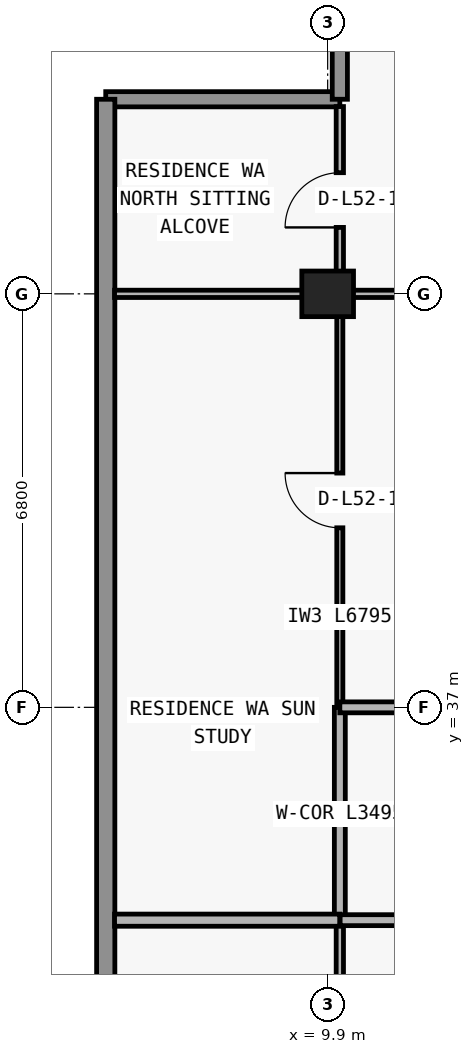
"""IFC4 building model, lengths in metres.
Left out: names, types, materials, properties, quantities, classifications, styles, units other than length and angle.
Written with IfcOpenShell. Run it as: python <this file> out.ifc"""

import sys

from ifc_helpers import new_model, si_unit, direction, frame, frame_2d, origin, origin_2d, place, context, subcontext, project, spatial, rectangle, extrude, element, fill, save


model = new_model("IFC4")
c1 = context("Model", 3, precision=1e-05, world=origin(), true_north=direction((0.0, 1.0)))
c2 = subcontext(c1, "Body", "Model", "MODEL_VIEW")
j1 = project(units=[si_unit("LENGTHUNIT", "METRE"), si_unit("PLANEANGLEUNIT", "RADIAN")], contexts=[c1])
p1 = place(None, origin())
s1 = spatial("IfcSite", under=j1, at=p1, CompositionType="ELEMENT")
p2 = place(p1, origin())
s2 = spatial("IfcBuilding", under=s1, at=p2, CompositionType="ELEMENT")
p3 = place(p2, frame((0.0, 0.0, 188.4)))
s3 = spatial("IfcBuildingStorey", under=s2, at=p3, CompositionType="ELEMENT", Elevation=188.4)
p4 = place(p3, frame((9.9, 43.8, 0.0), z_axis=(0.0, 0.0, 1.0), x_axis=(1.0, 0.0, 0.0)))
e1 = element("IfcColumn", 1, at=p4, inside=s3, PredefinedType="COLUMN", context=c2, shape_type="SweptSolid", body=[
    extrude(rectangle(XDim=0.85, YDim=0.75, at=origin_2d()), origin(), (0.0, 0.0, 1.0), 3.05),
])
p5 = place(p3, frame((6.25, 47.0, 0.0), z_axis=(0.0, 0.0, 1.0), x_axis=(1.0, 0.0, 0.0)))
e2 = element("IfcWall", 2, at=p5, inside=s3, PredefinedType="ELEMENTEDWALL", context=c2, shape_type="SweptSolid", body=[
    extrude(rectangle(XDim=3.85, YDim=0.25, at=frame_2d((1.925, 0.0))), origin(), (0.0, 0.0, 1.0), 3.05),
])
p6 = place(p3, frame((10.1, 47.0, 0.0), z_axis=(0.0, 0.0, 1.0), x_axis=(0.0, 1.0, 0.0)))
e3 = element("IfcWall", 3, at=p6, inside=s3, PredefinedType="ELEMENTEDWALL", context=c2, shape_type="SweptSolid", body=[
    extrude(rectangle(XDim=3.45, YDim=0.25, at=frame_2d((1.725, 0.0))), origin(), (0.0, 0.0, 1.0), 3.05),
])
p7 = place(p3, frame((6.25, 29.1, 0.0), z_axis=(0.0, 0.0, 1.0), x_axis=(0.0, 1.0, 0.0)))
e4 = element("IfcWall", 4, at=p7, inside=s3, PredefinedType="STANDARD", context=c2, shape_type="SweptSolid", body=[
    extrude(rectangle(XDim=17.9, YDim=0.3, at=frame_2d((8.95, 0.0))), origin(), (0.0, 0.0, 1.0), 3.05),
])
p8 = place(p3, frame((10.1, 27.18, 0.0), z_axis=(0.0, 0.0, 1.0), x_axis=(0.0, 1.0, 0.0)))
e5 = element("IfcWall", 5, at=p8, inside=s3, PredefinedType="PARTITIONING", context=c2, shape_type="SweptSolid", body=[
    extrude(rectangle(XDim=6.32, YDim=0.12, at=frame_2d((3.16, 0.0))), origin(), (0.0, 0.0, 1.0), 2.263),
])
p9 = place(p3, frame((10.1, 33.505, 0.0), z_axis=(0.0, 0.0, 1.0), x_axis=(0.0, 1.0, 0.0)))
e6 = element("IfcWall", 6, at=p9, inside=s3, PredefinedType="PARTITIONING", context=c2, shape_type="SweptSolid", body=[
    extrude(rectangle(XDim=3.495, YDim=0.18, at=frame_2d((1.748, 0.0))), origin(), (0.0, 0.0, 1.0), 2.263),
])
p10 = place(p3, frame((10.1, 37.005, 0.0), z_axis=(0.0, 0.0, 1.0), x_axis=(0.0, 1.0, 0.0)))
e7 = element("IfcWall", 7, at=p10, inside=s3, PredefinedType="MOVABLE", context=c2, shape_type="SweptSolid", body=[
    extrude(rectangle(XDim=6.795, YDim=0.1, at=frame_2d((3.397, 0.0))), origin(), (0.0, 0.0, 1.0), 2.263),
])
p11 = place(p10, frame((2.948, 0.0, 0.0)))
e8 = element("IfcOpeningElement", 8, at=p11, cuts=e7, PredefinedType="OPENING", context=c2, shape_type="SweptSolid", body=[
    extrude(rectangle(XDim=0.9, YDim=2.15, at=frame_2d((0.45, 1.075))), frame((0.0, 0.06, 0.0), z_axis=(0.0, -1.0, 0.0), x_axis=(1.0, 0.0, 0.0)), (0.0, 0.0, 1.0), 0.12),
])
p12 = place(p3, frame((10.1, 43.805, 0.0), z_axis=(0.0, 0.0, 1.0), x_axis=(0.0, 1.0, 0.0)))
e9 = element("IfcWall", 9, at=p12, inside=s3, PredefinedType="PARTITIONING", context=c2, shape_type="SweptSolid", body=[
    extrude(rectangle(XDim=3.075, YDim=0.12, at=frame_2d((1.538, 0.0))), origin(), (0.0, 0.0, 1.0), 3.05),
])
p13 = place(p12, frame((1.087, 0.0, 0.0)))
e10 = element("IfcOpeningElement", 10, at=p13, cuts=e9, PredefinedType="OPENING", context=c2, shape_type="SweptSolid", body=[
    extrude(rectangle(XDim=0.9, YDim=2.15, at=frame_2d((0.45, 1.075))), frame((0.0, 0.07, 0.0), z_axis=(0.0, -1.0, 0.0), x_axis=(1.0, 0.0, 0.0)), (0.0, 0.0, 1.0), 0.14),
])
p14 = place(p3, frame((6.395, 33.5, 0.0), z_axis=(0.0, 0.0, 1.0), x_axis=(1.0, 0.0, 0.0)))
e11 = element("IfcWall", 11, at=p14, inside=s3, PredefinedType="PARTITIONING", context=c2, shape_type="SweptSolid", body=[
    extrude(rectangle(XDim=3.705, YDim=0.2, at=frame_2d((1.853, 0.0))), origin(), (0.0, 0.0, 1.0), 3.05),
])
p15 = place(p3, frame((10.105, 33.5, 0.0), z_axis=(0.0, 0.0, 1.0), x_axis=(1.0, 0.0, 0.0)))
e12 = element("IfcWall", 12, at=p15, inside=s3, PredefinedType="PARTITIONING", context=c2, shape_type="SweptSolid", body=[
    extrude(rectangle(XDim=16.545, YDim=0.18, at=frame_2d((8.272, 0.0))), origin(), (0.0, 0.0, 1.0), 3.05),
])
p16 = place(p15, frame((2.824, 0.0, 0.0)))
e13 = element("IfcOpeningElement", 13, at=p16, cuts=e12, PredefinedType="OPENING", context=c2, shape_type="SweptSolid", body=[
    extrude(rectangle(XDim=1.0, YDim=2.2, at=frame_2d((0.5, 1.1))), frame((0.0, 0.1, 0.0), z_axis=(0.0, -1.0, 0.0), x_axis=(1.0, 0.0, 0.0)), (0.0, 0.0, 1.0), 0.2),
])
p17 = place(p3, frame((10.1, 37.0, 0.0), z_axis=(0.0, 0.0, 1.0), x_axis=(1.0, 0.0, 0.0)))
e14 = element("IfcWall", 14, at=p17, inside=s3, PredefinedType="PARTITIONING", context=c2, shape_type="SweptSolid", body=[
    extrude(rectangle(XDim=7.845, YDim=0.18, at=frame_2d((3.922, 0.0))), origin(), (0.0, 0.0, 1.0), 3.05),
])
p18 = place(p17, frame((3.496, 0.0, 0.0)))
e15 = element("IfcOpeningElement", 15, at=p18, cuts=e14, PredefinedType="OPENING", context=c2, shape_type="SweptSolid", body=[
    extrude(rectangle(XDim=1.0, YDim=2.2, at=frame_2d((0.5, 1.1))), frame((0.0, 0.1, 0.0), z_axis=(0.0, -1.0, 0.0), x_axis=(1.0, 0.0, 0.0)), (0.0, 0.0, 1.0), 0.2),
])
p19 = place(p3, frame((6.395, 43.8, 0.0), z_axis=(0.0, 0.0, 1.0), x_axis=(1.0, 0.0, 0.0)))
e16 = element("IfcWall", 16, at=p19, inside=s3, PredefinedType="PARTITIONING", context=c2, shape_type="SweptSolid", body=[
    extrude(rectangle(XDim=11.56, YDim=0.12, at=frame_2d((5.78, 0.0))), origin(), (0.0, 0.0, 1.0), 2.418),
])
p20 = place(p19, frame((7.251, 0.0, 0.0)))
e17 = element("IfcOpeningElement", 17, at=p20, cuts=e16, PredefinedType="OPENING", context=c2, shape_type="SweptSolid", body=[
    extrude(rectangle(XDim=0.9, YDim=2.15, at=frame_2d((0.45, 1.075))), frame((0.0, 0.07, 0.0), z_axis=(0.0, -1.0, 0.0), x_axis=(1.0, 0.0, 0.0)), (0.0, 0.0, 1.0), 0.14),
])
p21 = place(p19, frame((9.982, 0.0, 0.0)))
e18 = element("IfcOpeningElement", 18, at=p21, cuts=e16, PredefinedType="OPENING", context=c2, shape_type="SweptSolid", body=[
    extrude(rectangle(XDim=0.85, YDim=2.1, at=frame_2d((0.425, 1.05))), frame((0.0, 0.07, 0.0), z_axis=(0.0, -1.0, 0.0), x_axis=(1.0, 0.0, 0.0)), (0.0, 0.0, 1.0), 0.14),
])
p22 = place(p11, origin())
e19 = element("IfcDoor", 19, at=p22, inside=s3, OperationType="SINGLE_SWING_RIGHT", PredefinedType="DOOR", context=c2, shape_type="SweptSolid", body=[
    extrude(rectangle(XDim=0.9, YDim=2.15, at=frame_2d((0.45, 1.075))), frame((0.0, 0.025, 0.0), z_axis=(0.0, -1.0, 0.0), x_axis=(1.0, 0.0, 0.0)), (0.0, 0.0, 1.0), 0.05),
])
fill(e8, e19)
p23 = place(p13, origin())
e20 = element("IfcDoor", 20, at=p23, inside=s3, OperationType="SINGLE_SWING_LEFT", PredefinedType="DOOR", context=c2, shape_type="SweptSolid", body=[
    extrude(rectangle(XDim=0.9, YDim=2.15, at=frame_2d((0.45, 1.075))), frame((0.0, 0.025, 0.0), z_axis=(0.0, -1.0, 0.0), x_axis=(1.0, 0.0, 0.0)), (0.0, 0.0, 1.0), 0.05),
])
fill(e10, e20)
save(model, sys.argv[1])
